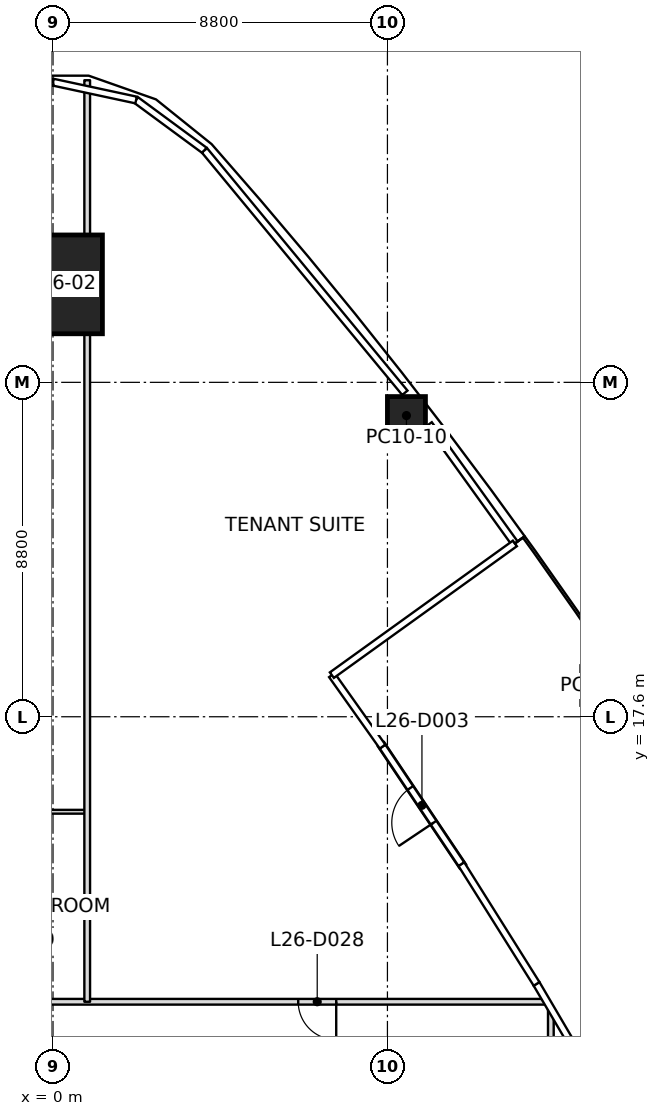
"""IFC4 building model, lengths in metres.
Left out: names, types, materials, properties, quantities, classifications, styles, units other than length and angle.
Written with IfcOpenShell. Run it as: python <this file> out.ifc"""

import sys

from ifc_helpers import new_model, si_unit, direction, frame, frame_2d, origin, origin_2d, place, context, subcontext, project, spatial, rectangle, extrude, clip, halfspace, element, fill, save


model = new_model("IFC4")
c1 = context("Model", 3, precision=1e-05, world=origin(), true_north=direction((0.0, 1.0)))
c2 = subcontext(c1, "Body", "Model", "MODEL_VIEW")
j1 = project(units=[si_unit("LENGTHUNIT", "METRE"), si_unit("PLANEANGLEUNIT", "RADIAN")], contexts=[c1])
p1 = place(None, origin())
s1 = spatial("IfcSite", under=j1, at=p1, CompositionType="ELEMENT")
p2 = place(p1, origin())
s2 = spatial("IfcBuilding", under=s1, at=p2, CompositionType="ELEMENT")
p3 = place(p2, frame((0.0, 0.0, 125.8)))
s3 = spatial("IfcBuildingStorey", under=s2, at=p3, CompositionType="ELEMENT", Elevation=125.8)
p4 = place(p3, frame((0.0, 28.978, 0.0), z_axis=(0.0, -0.032453598962, 0.999473243221), x_axis=(1.0, 0.0, 0.0)))
e1 = element("IfcColumn", 1, at=p4, inside=s3, PredefinedType="COLUMN", context=c2, shape_type="SweptSolid", body=[
    clip(extrude(rectangle(XDim=2.6, YDim=2.6, at=origin_2d()), origin(), (0.0, 0.0, 1.0), 4.002), halfspace(frame((0.0, 0.0, 0.01)), True)),
])
p5 = place(p3, frame((14.413, 18.422, 0.0), z_axis=(-0.005248486563, -0.013304303149, 0.999897719223), x_axis=(-0.556731672448, 0.830652602825, 0.008130086889)))
e2 = element("IfcColumn", 2, at=p5, inside=s3, PredefinedType="COLUMN", context=c2, shape_type="SweptSolid", body=[
    clip(extrude(rectangle(XDim=1.0, YDim=1.0, at=origin_2d()), origin(), (0.0, 0.0, 1.0), 4.0), halfspace(frame((0.0, 0.0, 0.002)), True)),
])
p6 = place(p3, frame((9.3, 25.526, 0.0), z_axis=(-0.000183066744, -0.020564497584, 0.999788511599), x_axis=(-0.610992464554, 0.791471295287, 0.016167776435)))
e3 = element("IfcColumn", 3, at=p6, inside=s3, PredefinedType="COLUMN", context=c2, shape_type="SweptSolid", body=[
    clip(extrude(rectangle(XDim=1.0, YDim=1.0, at=origin_2d()), origin(), (0.0, 0.0, 1.0), 4.001), halfspace(frame((0.0, 0.0, 0.003)), True)),
])
p7 = place(p3, frame((10.794, 13.648, 0.0), z_axis=(0.0, 0.0, 1.0), x_axis=(-0.556705257018, 0.830710091914, 0.0)))
e4 = element("IfcWall", 4, at=p7, inside=s3, PredefinedType="SOLIDWALL", context=c2, shape_type="SweptSolid", body=[
    extrude(rectangle(XDim=3.903, YDim=0.2, at=frame_2d((1.951, 0.0))), origin(), (0.0, 0.0, 1.0), 3.34),
])
p8 = place(p7, frame((1.401, 0.0, 0.0)))
e5 = element("IfcOpeningElement", 5, at=p8, cuts=e4, PredefinedType="OPENING", context=c2, shape_type="SweptSolid", body=[
    extrude(rectangle(XDim=1.1, YDim=2.1, at=frame_2d((0.55, 1.05))), frame((0.0, 0.1, 0.0), z_axis=(0.0, -1.0, 0.0), x_axis=(1.0, 0.0, 0.0)), (0.0, 0.0, 1.0), 0.2),
])
p9 = place(p3, frame((0.9, 10.1, 0.0), z_axis=(0.0, 0.0, 1.0), x_axis=(0.0, 1.0, 0.0)))
e6 = element("IfcWall", 6, at=p9, inside=s3, PredefinedType="PARTITIONING", context=c2, shape_type="SweptSolid", body=[
    extrude(rectangle(XDim=24.25, YDim=0.15, at=frame_2d((12.125, 0.0))), origin(), (0.0, 0.0, 1.0), 3.234),
])
p10 = place(p3, frame((13.005, 10.1, 0.0), z_axis=(0.0, 0.0, 1.0), x_axis=(-1.0, 0.0, 0.0)))
e7 = element("IfcWall", 7, at=p10, inside=s3, PredefinedType="PARTITIONING", context=c2, shape_type="SweptSolid", body=[
    extrude(rectangle(XDim=26.025, YDim=0.15, at=frame_2d((13.012, 0.0))), origin(), (0.0, 0.0, 1.0), 3.166),
])
p11 = place(p10, frame((5.552, 0.0, 0.0)))
e8 = element("IfcOpeningElement", 8, at=p11, cuts=e7, PredefinedType="OPENING", context=c2, shape_type="SweptSolid", body=[
    extrude(rectangle(XDim=1.0, YDim=2.1, at=frame_2d((0.5, 1.05))), frame((0.0, 0.075, 0.0), z_axis=(0.0, -1.0, 0.0), x_axis=(1.0, 0.0, 0.0)), (0.0, 0.0, 1.0), 0.15),
])
p12 = place(p10, frame((13.755, 0.0, 0.0)))
e9 = element("IfcOpeningElement", 9, at=p12, cuts=e7, PredefinedType="OPENING", context=c2, shape_type="SweptSolid", body=[
    extrude(rectangle(XDim=0.9, YDim=2.1, at=frame_2d((0.45, 1.05))), frame((0.0, 0.075, 0.0), z_axis=(0.0, -1.0, 0.0), x_axis=(1.0, 0.0, 0.0)), (0.0, 0.0, 1.0), 0.15),
])
p13 = place(p10, frame((20.765, 0.0, 0.0)))
e10 = element("IfcOpeningElement", 10, at=p13, cuts=e7, PredefinedType="OPENING", context=c2, shape_type="SweptSolid", body=[
    extrude(rectangle(XDim=1.0, YDim=2.1, at=frame_2d((0.5, 1.05))), frame((0.0, 0.075, 0.0), z_axis=(0.0, -1.0, 0.0), x_axis=(1.0, 0.0, 0.0)), (0.0, 0.0, 1.0), 0.15),
])
p14 = place(p3, frame((13.1, -10.02, 0.0), z_axis=(0.0, 0.0, 1.0), x_axis=(0.0, 1.0, 0.0)))
e11 = element("IfcWall", 11, at=p14, inside=s3, PredefinedType="PARTITIONING", context=c2, shape_type="SweptSolid", body=[
    extrude(rectangle(XDim=19.961, YDim=0.15, at=frame_2d((9.98, 0.0))), origin(), (0.0, 0.0, 1.0), 3.166),
])
p15 = place(p14, frame((12.461, 0.0, 0.0)))
e12 = element("IfcOpeningElement", 12, at=p15, cuts=e11, PredefinedType="OPENING", context=c2, shape_type="SweptSolid", body=[
    extrude(rectangle(XDim=1.0, YDim=2.1, at=frame_2d((0.5, 1.05))), frame((0.0, 0.075, 0.0), z_axis=(0.0, -1.0, 0.0), x_axis=(1.0, 0.0, 0.0)), (0.0, 0.0, 1.0), 0.15),
])
p16 = place(p14, frame((2.43, 0.0, 0.0)))
e13 = element("IfcOpeningElement", 13, at=p16, cuts=e11, PredefinedType="OPENING", context=c2, shape_type="SweptSolid", body=[
    extrude(rectangle(XDim=1.0, YDim=2.1, at=frame_2d((0.5, 1.05))), frame((0.0, 0.075, 0.0), z_axis=(0.0, -1.0, 0.0), x_axis=(1.0, 0.0, 0.0)), (0.0, 0.0, 1.0), 0.15),
])
p17 = place(p3, frame((-3.3, 15.1, 0.0), z_axis=(0.0, 0.0, 1.0), x_axis=(1.0, 0.0, 0.0)))
e14 = element("IfcWall", 14, at=p17, inside=s3, PredefinedType="PARTITIONING", context=c2, shape_type="SweptSolid", body=[
    extrude(rectangle(XDim=4.17, YDim=0.1, at=frame_2d((2.085, 0.0))), origin(), (0.0, 0.0, 1.0), 3.166),
])
p18 = place(p8, origin())
e15 = element("IfcDoor", 15, at=p18, inside=s3, OperationType="SINGLE_SWING_RIGHT", PredefinedType="DOOR", context=c2, shape_type="SweptSolid", body=[
    extrude(rectangle(XDim=1.1, YDim=2.1, at=frame_2d((0.55, 1.05))), frame((0.0, 0.025, 0.0), z_axis=(0.0, -1.0, 0.0), x_axis=(1.0, 0.0, 0.0)), (0.0, 0.0, 1.0), 0.05),
])
fill(e5, e15)
p19 = place(p11, origin())
e16 = element("IfcDoor", 16, at=p19, inside=s3, OperationType="SINGLE_SWING_RIGHT", PredefinedType="DOOR", context=c2, shape_type="SweptSolid", body=[
    extrude(rectangle(XDim=1.0, YDim=2.1, at=frame_2d((0.5, 1.05))), frame((0.0, 0.025, 0.0), z_axis=(0.0, -1.0, 0.0), x_axis=(1.0, 0.0, 0.0)), (0.0, 0.0, 1.0), 0.05),
])
fill(e8, e16)
save(model, sys.argv[1])
